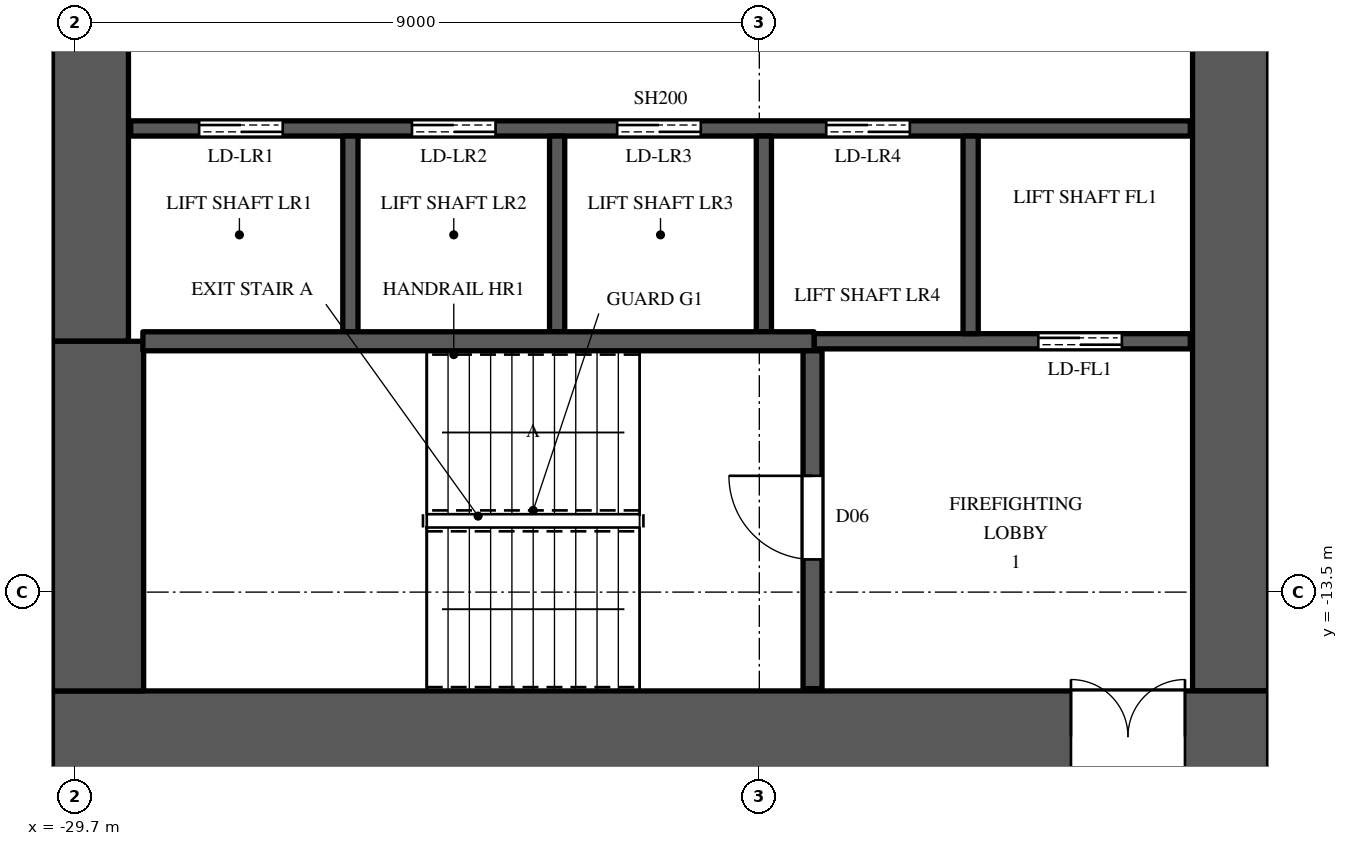
"""IFC4 building model, lengths in metres.
Left out: names, types, materials, properties, quantities, classifications, styles, units other than length and angle.
Written with IfcOpenShell. Run it as: python <this file> out.ifc"""

import sys

from ifc_helpers import new_model, si_unit, direction, frame, frame_2d, origin, place, context, subcontext, project, spatial, rectangle, extrude, element, fill, save


model = new_model("IFC4")
c1 = context("Model", 3, precision=1e-05, world=origin(), true_north=direction((0.0, 1.0)))
c2 = subcontext(c1, "Body", "Model", "MODEL_VIEW")
j1 = project(units=[si_unit("LENGTHUNIT", "METRE"), si_unit("PLANEANGLEUNIT", "RADIAN")], contexts=[c1])
p1 = place(None, origin())
s1 = spatial("IfcSite", under=j1, at=p1, CompositionType="ELEMENT")
p2 = place(p1, origin())
s2 = spatial("IfcBuilding", under=s1, at=p2, CompositionType="ELEMENT")
p3 = place(p2, frame((0.0, 0.0, 127.5)))
s3 = spatial("IfcBuildingStorey", under=s2, at=p3, CompositionType="ELEMENT", Elevation=127.5)
p4 = place(p3, frame((-30.0, -15.4, 0.0), z_axis=(0.0, 0.0, 1.0), x_axis=(1.0, 0.0, 0.0)))
e1 = element("IfcWall", 1, at=p4, inside=s3, PredefinedType="SHEAR", context=c2, shape_type="SweptSolid", body=[
    extrude(rectangle(XDim=16.0, YDim=1.2, at=frame_2d((8.0, 0.0))), origin(), (0.0, 0.0, 1.0), 3.6),
])
p5 = place(p4, frame((13.4, 0.0, 0.0)))
e2 = element("IfcOpeningElement", 2, at=p5, cuts=e1, PredefinedType="OPENING", context=c2, shape_type="SweptSolid", body=[
    extrude(rectangle(XDim=1.5, YDim=2.4, at=frame_2d((0.75, 1.2))), frame((0.0, 0.61, 0.0), z_axis=(0.0, -1.0, 0.0), x_axis=(1.0, 0.0, 0.0)), (0.0, 0.0, 1.0), 1.22),
])
p6 = place(p3, frame((-14.5, -14.8, 0.0), z_axis=(0.0, 0.0, 1.0), x_axis=(0.0, 1.0, 0.0)))
e3 = element("IfcWall", 3, at=p6, inside=s3, PredefinedType="SHEAR", context=c2, shape_type="SweptSolid", body=[
    extrude(rectangle(XDim=29.6, YDim=1.0, at=frame_2d((14.8, 0.0))), origin(), (0.0, 0.0, 1.0), 3.6),
])
p7 = place(p6, frame((8.45, 0.0, 0.0)))
e4 = element("IfcOpeningElement", 4, at=p7, cuts=e3, PredefinedType="OPENING", context=c2, shape_type="SweptSolid", body=[
    extrude(rectangle(XDim=1.5, YDim=2.4, at=frame_2d((0.75, 1.2))), frame((0.0, 0.51, 0.0), z_axis=(0.0, -1.0, 0.0), x_axis=(1.0, 0.0, 0.0)), (0.0, 0.0, 1.0), 1.02),
])
p8 = place(p6, frame((19.65, 0.0, 0.0)))
e5 = element("IfcOpeningElement", 5, at=p8, cuts=e3, PredefinedType="OPENING", context=c2, shape_type="SweptSolid", body=[
    extrude(rectangle(XDim=1.5, YDim=2.4, at=frame_2d((0.75, 1.2))), frame((0.0, 0.51, 0.0), z_axis=(0.0, -1.0, 0.0), x_axis=(1.0, 0.0, 0.0)), (0.0, 0.0, 1.0), 1.02),
])
p9 = place(p6, frame((14.5, 0.0, 0.0)))
e6 = element("IfcOpeningElement", 6, at=p9, cuts=e3, PredefinedType="OPENING", context=c2, shape_type="SweptSolid", body=[
    extrude(rectangle(XDim=0.6, YDim=2.0, at=frame_2d((0.3, 1.0))), frame((0.0, 0.51, 0.0), z_axis=(0.0, -1.0, 0.0), x_axis=(1.0, 0.0, 0.0)), (0.0, 0.0, 1.0), 1.02),
])
p10 = place(p3, frame((-29.5, -10.2, 0.0), z_axis=(0.0, 0.0, 1.0), x_axis=(0.0, 1.0, 0.0)))
e7 = element("IfcWall", 7, at=p10, inside=s3, PredefinedType="SHEAR", context=c2, shape_type="SweptSolid", body=[
    extrude(rectangle(XDim=20.4, YDim=1.0, at=frame_2d((10.2, 0.0))), origin(), (0.0, 0.0, 1.0), 3.6),
])
p11 = place(p3, frame((-29.4, -14.8, 0.0), z_axis=(0.0, 0.0, 1.0), x_axis=(0.0, 1.0, 0.0)))
e8 = element("IfcWall", 8, at=p11, inside=s3, PredefinedType="SHEAR", context=c2, shape_type="SweptSolid", body=[
    extrude(rectangle(XDim=4.6, YDim=1.2, at=frame_2d((2.3, 0.0))), origin(), (0.0, 0.0, 1.0), 3.6),
])
p12 = place(p3, frame((-28.97, -7.4, 0.0), z_axis=(0.0, 0.0, 1.0), x_axis=(1.0, 0.0, 0.0)))
e9 = element("IfcWall", 9, at=p12, inside=s3, PredefinedType="SHEAR", context=c2, shape_type="SweptSolid", body=[
    extrude(rectangle(XDim=13.94, YDim=0.2, at=frame_2d((6.97, 0.0))), origin(), (0.0, 0.0, 1.0), 3.3),
])
p13 = place(p12, frame((0.9, 0.0, 0.0)))
e10 = element("IfcOpeningElement", 10, at=p13, cuts=e9, PredefinedType="OPENING", context=c2, shape_type="SweptSolid", body=[
    extrude(rectangle(XDim=1.1, YDim=2.2, at=frame_2d((0.55, 1.1))), frame((0.0, 0.11, 0.0), z_axis=(0.0, -1.0, 0.0), x_axis=(1.0, 0.0, 0.0)), (0.0, 0.0, 1.0), 0.22),
])
p14 = place(p12, frame((3.7, 0.0, 0.0)))
e11 = element("IfcOpeningElement", 11, at=p14, cuts=e9, PredefinedType="OPENING", context=c2, shape_type="SweptSolid", body=[
    extrude(rectangle(XDim=1.1, YDim=2.2, at=frame_2d((0.55, 1.1))), frame((0.0, 0.11, 0.0), z_axis=(0.0, -1.0, 0.0), x_axis=(1.0, 0.0, 0.0)), (0.0, 0.0, 1.0), 0.22),
])
p15 = place(p12, frame((6.4, 0.0, 0.0)))
e12 = element("IfcOpeningElement", 12, at=p15, cuts=e9, PredefinedType="OPENING", context=c2, shape_type="SweptSolid", body=[
    extrude(rectangle(XDim=1.1, YDim=2.2, at=frame_2d((0.55, 1.1))), frame((0.0, 0.11, 0.0), z_axis=(0.0, -1.0, 0.0), x_axis=(1.0, 0.0, 0.0)), (0.0, 0.0, 1.0), 0.22),
])
p16 = place(p12, frame((9.15, 0.0, 0.0)))
e13 = element("IfcOpeningElement", 13, at=p16, cuts=e9, PredefinedType="OPENING", context=c2, shape_type="SweptSolid", body=[
    extrude(rectangle(XDim=1.1, YDim=2.2, at=frame_2d((0.55, 1.1))), frame((0.0, 0.11, 0.0), z_axis=(0.0, -1.0, 0.0), x_axis=(1.0, 0.0, 0.0)), (0.0, 0.0, 1.0), 0.22),
])
for number, where, z_axis, x_axis in (
    (14, (-26.08, -10.075, 0.0), (0.0, 0.0, 1.0), (0.0, 1.0, 0.0)),
    (15, (-23.36, -10.075, 0.0), (0.0, 0.0, 1.0), (0.0, 1.0, 0.0)),
    (16, (-20.64, -10.075, 0.0), (0.0, 0.0, 1.0), (0.0, 1.0, 0.0)),
):
    element("IfcWall", number, at=place(p3, frame(where, z_axis=z_axis, x_axis=x_axis)), inside=s3, PredefinedType="SHEAR", context=c2, shape_type="SweptSolid", body=[
        extrude(rectangle(XDim=2.575, YDim=0.2, at=frame_2d((1.288, 0.0))), origin(), (0.0, 0.0, 1.0), 3.6),
    ])
p17 = place(p3, frame((-19.98, -10.2, 0.0), z_axis=(0.0, 0.0, 1.0), x_axis=(1.0, 0.0, 0.0)))
e17 = element("IfcWall", 17, at=p17, inside=s3, PredefinedType="SHEAR", context=c2, shape_type="SweptSolid", body=[
    extrude(rectangle(XDim=4.95, YDim=0.2, at=frame_2d((2.475, 0.0))), origin(), (0.0, 0.0, 1.0), 3.3),
])
p18 = place(p17, frame((2.95, 0.0, 0.0)))
e18 = element("IfcOpeningElement", 18, at=p18, cuts=e17, PredefinedType="OPENING", context=c2, shape_type="SweptSolid", body=[
    extrude(rectangle(XDim=1.1, YDim=2.2, at=frame_2d((0.55, 1.1))), frame((0.0, 0.11, 0.0), z_axis=(0.0, -1.0, 0.0), x_axis=(1.0, 0.0, 0.0)), (0.0, 0.0, 1.0), 0.22),
])
p19 = place(p3, frame((-17.92, -10.1, 0.0), z_axis=(0.0, 0.0, 1.0), x_axis=(0.0, 1.0, 0.0)))
e19 = element("IfcWall", 19, at=p19, inside=s3, PredefinedType="SHEAR", context=c2, shape_type="SweptSolid", body=[
    extrude(rectangle(XDim=2.6, YDim=0.2, at=frame_2d((1.3, 0.0))), origin(), (0.0, 0.0, 1.0), 3.6),
])
p20 = place(p3, frame((-28.81, -10.2, 0.0), z_axis=(0.0, 0.0, 1.0), x_axis=(1.0, 0.0, 0.0)))
e20 = element("IfcWall", 20, at=p20, inside=s3, PredefinedType="SHEAR", context=c2, shape_type="SweptSolid", body=[
    extrude(rectangle(XDim=8.83, YDim=0.25, at=frame_2d((4.415, 0.0))), origin(), (0.0, 0.0, 1.0), 3.3),
])
p21 = place(p3, frame((-20.0, -14.77, 0.0), z_axis=(0.0, 0.0, 1.0), x_axis=(0.0, 1.0, 0.0)))
e21 = element("IfcWall", 21, at=p21, inside=s3, PredefinedType="SHEAR", context=c2, shape_type="SweptSolid", body=[
    extrude(rectangle(XDim=4.445, YDim=0.25, at=frame_2d((2.223, 0.0))), origin(), (0.0, 0.0, 1.0), 3.3),
])
p22 = place(p21, frame((1.7, 0.0, 0.0)))
e22 = element("IfcOpeningElement", 22, at=p22, cuts=e21, PredefinedType="OPENING", context=c2, shape_type="SweptSolid", body=[
    extrude(rectangle(XDim=1.1, YDim=2.2, at=frame_2d((0.55, 1.1))), frame((0.0, 0.135, 0.0), z_axis=(0.0, -1.0, 0.0), x_axis=(1.0, 0.0, 0.0)), (0.0, 0.0, 1.0), 0.27),
])
p23 = place(p22, origin())
e23 = element("IfcDoor", 23, at=p23, inside=s3, OperationType="SINGLE_SWING_RIGHT", PredefinedType="DOOR", context=c2, shape_type="SweptSolid", body=[
    extrude(rectangle(XDim=1.1, YDim=2.2, at=frame_2d((0.55, 1.1))), frame((0.0, 0.025, 0.0), z_axis=(0.0, -1.0, 0.0), x_axis=(1.0, 0.0, 0.0)), (0.0, 0.0, 1.0), 0.05),
])
fill(e22, e23)
p24 = place(p13, origin())
e24 = element("IfcDoor", 24, at=p24, inside=s3, OperationType="DOUBLE_DOOR_SLIDING", PredefinedType="DOOR", context=c2, shape_type="SweptSolid", body=[
    extrude(rectangle(XDim=1.1, YDim=2.2, at=frame_2d((0.55, 1.1))), frame((0.0, 0.025, 0.0), z_axis=(0.0, -1.0, 0.0), x_axis=(1.0, 0.0, 0.0)), (0.0, 0.0, 1.0), 0.05),
])
fill(e10, e24)
p25 = place(p14, origin())
e25 = element("IfcDoor", 25, at=p25, inside=s3, OperationType="DOUBLE_DOOR_SLIDING", PredefinedType="DOOR", context=c2, shape_type="SweptSolid", body=[
    extrude(rectangle(XDim=1.1, YDim=2.2, at=frame_2d((0.55, 1.1))), frame((0.0, 0.025, 0.0), z_axis=(0.0, -1.0, 0.0), x_axis=(1.0, 0.0, 0.0)), (0.0, 0.0, 1.0), 0.05),
])
fill(e11, e25)
p26 = place(p15, origin())
e26 = element("IfcDoor", 26, at=p26, inside=s3, OperationType="DOUBLE_DOOR_SLIDING", PredefinedType="DOOR", context=c2, shape_type="SweptSolid", body=[
    extrude(rectangle(XDim=1.1, YDim=2.2, at=frame_2d((0.55, 1.1))), frame((0.0, 0.025, 0.0), z_axis=(0.0, -1.0, 0.0), x_axis=(1.0, 0.0, 0.0)), (0.0, 0.0, 1.0), 0.05),
])
fill(e12, e26)
p27 = place(p16, origin())
e27 = element("IfcDoor", 27, at=p27, inside=s3, OperationType="DOUBLE_DOOR_SLIDING", PredefinedType="DOOR", context=c2, shape_type="SweptSolid", body=[
    extrude(rectangle(XDim=1.1, YDim=2.2, at=frame_2d((0.55, 1.1))), frame((0.0, 0.025, 0.0), z_axis=(0.0, -1.0, 0.0), x_axis=(1.0, 0.0, 0.0)), (0.0, 0.0, 1.0), 0.05),
])
fill(e13, e27)
p28 = place(p18, origin())
e28 = element("IfcDoor", 28, at=p28, inside=s3, OperationType="DOUBLE_DOOR_SLIDING", PredefinedType="DOOR", context=c2, shape_type="SweptSolid", body=[
    extrude(rectangle(XDim=1.1, YDim=2.2, at=frame_2d((0.55, 1.1))), frame((0.0, 0.025, 0.0), z_axis=(0.0, -1.0, 0.0), x_axis=(1.0, 0.0, 0.0)), (0.0, 0.0, 1.0), 0.05),
])
fill(e18, e28)
p29 = place(p5, origin())
e29 = element("IfcDoor", 29, at=p29, inside=s3, OperationType="DOUBLE_DOOR_SINGLE_SWING", PredefinedType="DOOR", context=c2, shape_type="SweptSolid", body=[
    extrude(rectangle(XDim=1.5, YDim=2.4, at=frame_2d((0.75, 1.2))), frame((0.0, 0.025, 0.0), z_axis=(0.0, -1.0, 0.0), x_axis=(1.0, 0.0, 0.0)), (0.0, 0.0, 1.0), 0.05),
])
fill(e2, e29)
save(model, sys.argv[1])
